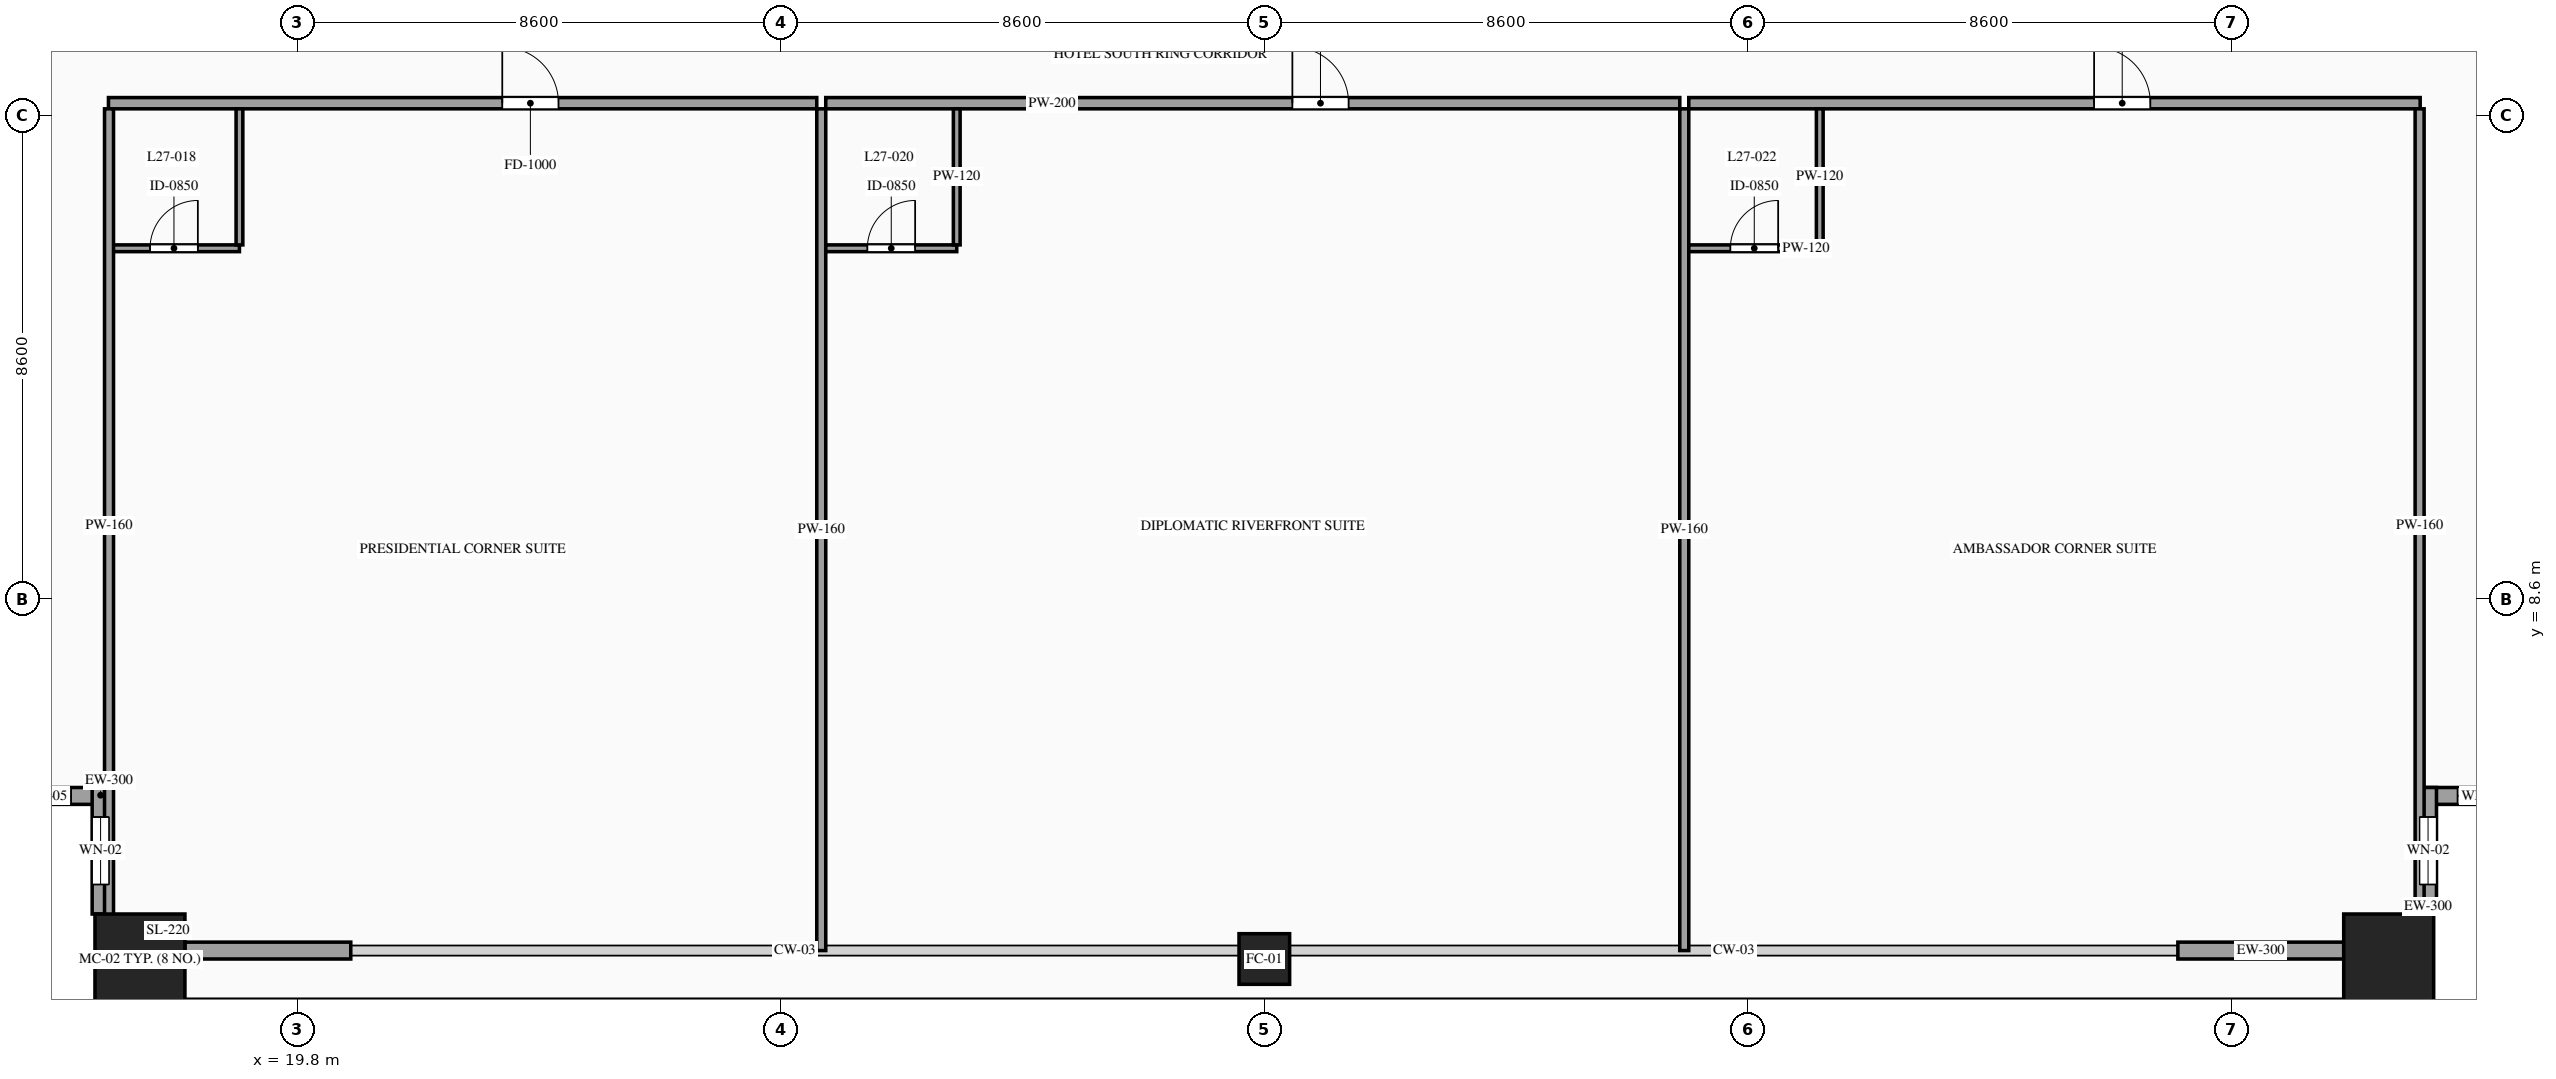
"""IFC4 building model, lengths in metres.
Left out: names, types, materials, properties, quantities, classifications, styles, units other than length and angle.
Written with IfcOpenShell. Run it as: python <this file> out.ifc"""

import sys

from ifc_helpers import new_model, si_unit, direction, frame, frame_2d, origin, origin_2d, place, context, subcontext, project, spatial, rectangle, hollow_rectangle, extrude, source, transform, mapped, element, fill, save


model = new_model("IFC4")
c1 = context("Model", 3, precision=1e-05, world=origin(), true_north=direction((0.0, 1.0)))
c2 = subcontext(c1, "Body", "Model", "MODEL_VIEW")
j1 = project(units=[si_unit("LENGTHUNIT", "METRE"), si_unit("PLANEANGLEUNIT", "RADIAN")], contexts=[c1])
p1 = place(None, origin())
s1 = spatial("IfcSite", under=j1, at=p1, CompositionType="ELEMENT")
p2 = place(p1, origin())
s2 = spatial("IfcBuilding", under=s1, at=p2, CompositionType="ELEMENT")
p3 = place(p2, frame((0.0, 0.0, 104.6)))
s3 = spatial("IfcBuildingStorey", under=s2, at=p3, CompositionType="ELEMENT", Elevation=104.6)
m1 = source(origin(), c2, "Body", "SweptSolid", [
    extrude(hollow_rectangle(XDim=1.6, YDim=1.6, WallThickness=0.07, at=origin_2d()), origin(), (0.0, 0.0, 1.0), 3.6),
])
p4 = place(p3, frame((17.0, 2.2, 0.0), z_axis=(0.0, 0.0, 1.0), x_axis=(1.0, 0.0, 0.0)))
e1 = element("IfcColumn", 1, at=p4, inside=s3, PredefinedType="COLUMN", context=c2, shape_type="MappedRepresentation", body=[
    mapped(m1, transform((0.0, 0.0, 0.0), scale=1.0)),
])
m2 = source(origin(), c2, "Body", "SweptSolid", [
    extrude(hollow_rectangle(XDim=0.9, YDim=0.9, WallThickness=0.042, at=origin_2d()), origin(), (0.0, 0.0, 1.0), 3.6),
])
p5 = place(p3, frame((37.0, 2.2, 0.0), z_axis=(0.0, 0.0, 1.0), x_axis=(1.0, 0.0, 0.0)))
e2 = element("IfcColumn", 2, at=p5, inside=s3, PredefinedType="COLUMN", context=c2, shape_type="MappedRepresentation", body=[
    mapped(m2, transform((0.0, 0.0, 0.0), scale=1.0)),
])
p6 = place(p3, frame((57.0, 2.2, 0.0), z_axis=(0.0, 0.0, 1.0), x_axis=(1.0, 0.0, 0.0)))
e3 = element("IfcColumn", 3, at=p6, inside=s3, PredefinedType="COLUMN", context=c2, shape_type="MappedRepresentation", body=[
    mapped(m1, transform((0.0, 0.0, 0.0), scale=1.0)),
])
p7 = place(p3, frame((14.2, 5.1, 0.0), z_axis=(0.0, 0.0, 1.0), x_axis=(1.0, 0.0, 0.0)))
e4 = element("IfcWall", 4, at=p7, inside=s3, PredefinedType="SOLIDWALL", context=c2, shape_type="SweptSolid", body=[
    extrude(rectangle(XDim=2.25, YDim=0.3, at=frame_2d((1.125, 0.0))), origin(), (0.0, 0.0, 1.0), 3.38),
])
p8 = place(p7, frame((0.675, 0.0, 0.85)))
e5 = element("IfcOpeningElement", 5, at=p8, cuts=e4, PredefinedType="OPENING", context=c2, shape_type="SweptSolid", body=[
    extrude(rectangle(XDim=0.9, YDim=1.5, at=frame_2d((0.45, 0.75))), frame((0.0, 0.165, 0.0), z_axis=(0.0, -1.0, 0.0), x_axis=(1.0, 0.0, 0.0)), (0.0, 0.0, 1.0), 0.33),
])
p9 = place(p3, frame((16.3, 5.25, 0.0), z_axis=(0.0, 0.0, 1.0), x_axis=(0.0, -1.0, 0.0)))
e6 = element("IfcWall", 6, at=p9, inside=s3, PredefinedType="SOLIDWALL", context=c2, shape_type="SweptSolid", body=[
    extrude(rectangle(XDim=2.25, YDim=0.3, at=frame_2d((1.125, 0.0))), origin(), (0.0, 0.0, 1.0), 3.38),
])
p10 = place(p9, frame((0.525, 0.0, 0.85)))
e7 = element("IfcOpeningElement", 7, at=p10, cuts=e6, PredefinedType="OPENING", context=c2, shape_type="SweptSolid", body=[
    extrude(rectangle(XDim=1.2, YDim=2.1, at=frame_2d((0.6, 1.05))), frame((0.0, 0.165, 0.0), z_axis=(0.0, -1.0, 0.0), x_axis=(1.0, 0.0, 0.0)), (0.0, 0.0, 1.0), 0.33),
])
p11 = place(p3, frame((57.55, 5.1, 0.0), z_axis=(0.0, 0.0, 1.0), x_axis=(1.0, 0.0, 0.0)))
e8 = element("IfcWall", 8, at=p11, inside=s3, PredefinedType="SOLIDWALL", context=c2, shape_type="SweptSolid", body=[
    extrude(rectangle(XDim=2.25, YDim=0.3, at=frame_2d((1.125, 0.0))), origin(), (0.0, 0.0, 1.0), 3.38),
])
p12 = place(p11, frame((0.675, 0.0, 0.85)))
e9 = element("IfcOpeningElement", 9, at=p12, cuts=e8, PredefinedType="OPENING", context=c2, shape_type="SweptSolid", body=[
    extrude(rectangle(XDim=0.9, YDim=1.5, at=frame_2d((0.45, 0.75))), frame((0.0, 0.165, 0.0), z_axis=(0.0, -1.0, 0.0), x_axis=(1.0, 0.0, 0.0)), (0.0, 0.0, 1.0), 0.33),
])
p13 = place(p3, frame((57.7, 3.0, 0.0), z_axis=(0.0, 0.0, 1.0), x_axis=(0.0, 1.0, 0.0)))
e10 = element("IfcWall", 10, at=p13, inside=s3, PredefinedType="SOLIDWALL", context=c2, shape_type="SweptSolid", body=[
    extrude(rectangle(XDim=2.25, YDim=0.3, at=frame_2d((1.125, 0.0))), origin(), (0.0, 0.0, 1.0), 3.38),
])
p14 = place(p13, frame((0.525, 0.0, 0.85)))
e11 = element("IfcOpeningElement", 11, at=p14, cuts=e10, PredefinedType="OPENING", context=c2, shape_type="SweptSolid", body=[
    extrude(rectangle(XDim=1.2, YDim=2.1, at=frame_2d((0.6, 1.05))), frame((0.0, 0.165, 0.0), z_axis=(0.0, -1.0, 0.0), x_axis=(1.0, 0.0, 0.0)), (0.0, 0.0, 1.0), 0.33),
])
m3 = source(origin(), c2, "Body", "SweptSolid", [
    extrude(rectangle(XDim=2.95, YDim=0.3, at=frame_2d((1.475, 0.0))), origin(), (0.0, 0.0, 1.0), 2.775),
])
for number, where, z_axis, x_axis in (
    (12, (17.8, 2.35, 0.0), (0.0, 0.0, 1.0), (1.0, 0.0, 0.0)),
    (13, (53.25, 2.35, 0.0), (0.0, 0.0, 1.0), (1.0, 0.0, 0.0)),
):
    element("IfcWall", number, at=place(p3, frame(where, z_axis=z_axis, x_axis=x_axis)), inside=s3, PredefinedType="SOLIDWALL", context=c2, shape_type="MappedRepresentation", body=[
        mapped(m3, transform((0.0, 0.0, 0.0), scale=1.0)),
    ])
p15 = place(p3, frame((16.44, 17.42, 0.0), z_axis=(0.0, 0.0, 1.0), x_axis=(1.0, 0.0, 0.0)))
e14 = element("IfcWall", 14, at=p15, inside=s3, PredefinedType="PARTITIONING", context=c2, shape_type="SweptSolid", body=[
    extrude(rectangle(XDim=12.599, YDim=0.2, at=frame_2d((6.3, 0.0))), origin(), (0.0, 0.0, 1.0), 3.38),
])
p16 = place(p15, frame((7.005, 0.0, 0.0)))
e15 = element("IfcOpeningElement", 15, at=p16, cuts=e14, PredefinedType="OPENING", context=c2, shape_type="SweptSolid", body=[
    extrude(rectangle(XDim=1.0, YDim=2.2, at=frame_2d((0.5, 1.1))), frame((0.0, 0.115, 0.0), z_axis=(0.0, -1.0, 0.0), x_axis=(1.0, 0.0, 0.0)), (0.0, 0.0, 1.0), 0.23),
])
m4 = source(origin(), c2, "Body", "SweptSolid", [
    extrude(rectangle(XDim=14.97, YDim=0.16, at=frame_2d((7.485, 0.0))), origin(), (0.0, 0.0, 1.0), 3.38),
])
p17 = place(p3, frame((29.119, 2.35, 0.0), z_axis=(0.0, 0.0, 1.0), x_axis=(0.0, 1.0, 0.0)))
e16 = element("IfcWall", 16, at=p17, inside=s3, PredefinedType="PARTITIONING", context=c2, shape_type="MappedRepresentation", body=[
    mapped(m4, transform((0.0, 0.0, 0.0), scale=1.0)),
])
p18 = place(p3, frame((16.44, 14.84, 0.0), z_axis=(0.0, 0.0, 1.0), x_axis=(1.0, 0.0, 0.0)))
e17 = element("IfcWall", 17, at=p18, inside=s3, PredefinedType="PARTITIONING", context=c2, shape_type="SweptSolid", body=[
    extrude(rectangle(XDim=2.33, YDim=0.12, at=frame_2d((1.165, 0.0))), origin(), (0.0, 0.0, 1.0), 3.38),
])
p19 = place(p18, frame((0.74, 0.0, 0.0)))
e18 = element("IfcOpeningElement", 18, at=p19, cuts=e17, PredefinedType="OPENING", context=c2, shape_type="SweptSolid", body=[
    extrude(rectangle(XDim=0.85, YDim=2.1, at=frame_2d((0.425, 1.05))), frame((0.0, 0.075, 0.0), z_axis=(0.0, -1.0, 0.0), x_axis=(1.0, 0.0, 0.0)), (0.0, 0.0, 1.0), 0.15),
])
m5 = source(origin(), c2, "Body", "SweptSolid", [
    extrude(rectangle(XDim=2.42, YDim=0.12, at=frame_2d((1.21, 0.0))), origin(), (0.0, 0.0, 1.0), 3.38),
])
p20 = place(p3, frame((18.77, 14.9, 0.0), z_axis=(0.0, 0.0, 1.0), x_axis=(0.0, 1.0, 0.0)))
e19 = element("IfcWall", 19, at=p20, inside=s3, PredefinedType="PARTITIONING", context=c2, shape_type="MappedRepresentation", body=[
    mapped(m5, transform((0.0, 0.0, 0.0), scale=1.0)),
])
p21 = place(p3, frame((29.199, 17.42, 0.0), z_axis=(0.0, 0.0, 1.0), x_axis=(1.0, 0.0, 0.0)))
e20 = element("IfcWall", 20, at=p21, inside=s3, PredefinedType="PARTITIONING", context=c2, shape_type="SweptSolid", body=[
    extrude(rectangle(XDim=15.191, YDim=0.2, at=frame_2d((7.595, 0.0))), origin(), (0.0, 0.0, 1.0), 3.38),
])
p22 = place(p21, frame((8.3, 0.0, 0.0)))
e21 = element("IfcOpeningElement", 21, at=p22, cuts=e20, PredefinedType="OPENING", context=c2, shape_type="SweptSolid", body=[
    extrude(rectangle(XDim=1.0, YDim=2.2, at=frame_2d((0.5, 1.1))), frame((0.0, 0.115, 0.0), z_axis=(0.0, -1.0, 0.0), x_axis=(1.0, 0.0, 0.0)), (0.0, 0.0, 1.0), 0.23),
])
p23 = place(p3, frame((44.47, 2.35, 0.0), z_axis=(0.0, 0.0, 1.0), x_axis=(0.0, 1.0, 0.0)))
e22 = element("IfcWall", 22, at=p23, inside=s3, PredefinedType="PARTITIONING", context=c2, shape_type="MappedRepresentation", body=[
    mapped(m4, transform((0.0, 0.0, 0.0), scale=1.0)),
])
p24 = place(p3, frame((29.199, 14.84, 0.0), z_axis=(0.0, 0.0, 1.0), x_axis=(1.0, 0.0, 0.0)))
e23 = element("IfcWall", 23, at=p24, inside=s3, PredefinedType="PARTITIONING", context=c2, shape_type="SweptSolid", body=[
    extrude(rectangle(XDim=2.33, YDim=0.12, at=frame_2d((1.165, 0.0))), origin(), (0.0, 0.0, 1.0), 3.38),
])
p25 = place(p24, frame((0.74, 0.0, 0.0)))
e24 = element("IfcOpeningElement", 24, at=p25, cuts=e23, PredefinedType="OPENING", context=c2, shape_type="SweptSolid", body=[
    extrude(rectangle(XDim=0.85, YDim=2.1, at=frame_2d((0.425, 1.05))), frame((0.0, 0.075, 0.0), z_axis=(0.0, -1.0, 0.0), x_axis=(1.0, 0.0, 0.0)), (0.0, 0.0, 1.0), 0.15),
])
p26 = place(p3, frame((31.529, 14.9, 0.0), z_axis=(0.0, 0.0, 1.0), x_axis=(0.0, 1.0, 0.0)))
e25 = element("IfcWall", 25, at=p26, inside=s3, PredefinedType="PARTITIONING", context=c2, shape_type="MappedRepresentation", body=[
    mapped(m5, transform((0.0, 0.0, 0.0), scale=1.0)),
])
p27 = place(p3, frame((44.55, 17.42, 0.0), z_axis=(0.0, 0.0, 1.0), x_axis=(1.0, 0.0, 0.0)))
e26 = element("IfcWall", 26, at=p27, inside=s3, PredefinedType="PARTITIONING", context=c2, shape_type="SweptSolid", body=[
    extrude(rectangle(XDim=13.01, YDim=0.2, at=frame_2d((6.505, 0.0))), origin(), (0.0, 0.0, 1.0), 3.38),
])
p28 = place(p27, frame((7.21, 0.0, 0.0)))
e27 = element("IfcOpeningElement", 27, at=p28, cuts=e26, PredefinedType="OPENING", context=c2, shape_type="SweptSolid", body=[
    extrude(rectangle(XDim=1.0, YDim=2.2, at=frame_2d((0.5, 1.1))), frame((0.0, 0.115, 0.0), z_axis=(0.0, -1.0, 0.0), x_axis=(1.0, 0.0, 0.0)), (0.0, 0.0, 1.0), 0.23),
])
m6 = source(origin(), c2, "Body", "SweptSolid", [
    extrude(rectangle(XDim=14.82, YDim=0.16, at=frame_2d((7.41, 0.0))), origin(), (0.0, 0.0, 1.0), 3.38),
])
for number, where, z_axis, x_axis in (
    (28, (16.45, 2.5, 0.0), (0.0, 0.0, 1.0), (0.0, 1.0, 0.0)),
    (29, (57.55, 2.5, 0.0), (0.0, 0.0, 1.0), (0.0, 1.0, 0.0)),
):
    element("IfcWall", number, at=place(p3, frame(where, z_axis=z_axis, x_axis=x_axis)), inside=s3, PredefinedType="PARTITIONING", context=c2, shape_type="MappedRepresentation", body=[
        mapped(m6, transform((0.0, 0.0, 0.0), scale=1.0)),
    ])
p29 = place(p3, frame((44.55, 14.84, 0.0), z_axis=(0.0, 0.0, 1.0), x_axis=(1.0, 0.0, 0.0)))
e30 = element("IfcWall", 30, at=p29, inside=s3, PredefinedType="PARTITIONING", context=c2, shape_type="SweptSolid", body=[
    extrude(rectangle(XDim=2.33, YDim=0.12, at=frame_2d((1.165, 0.0))), origin(), (0.0, 0.0, 1.0), 3.38),
])
p30 = place(p29, frame((0.74, 0.0, 0.0)))
e31 = element("IfcOpeningElement", 31, at=p30, cuts=e30, PredefinedType="OPENING", context=c2, shape_type="SweptSolid", body=[
    extrude(rectangle(XDim=0.85, YDim=2.1, at=frame_2d((0.425, 1.05))), frame((0.0, 0.075, 0.0), z_axis=(0.0, -1.0, 0.0), x_axis=(1.0, 0.0, 0.0)), (0.0, 0.0, 1.0), 0.15),
])
p31 = place(p3, frame((46.88, 14.9, 0.0), z_axis=(0.0, 0.0, 1.0), x_axis=(0.0, 1.0, 0.0)))
e32 = element("IfcWall", 32, at=p31, inside=s3, PredefinedType="PARTITIONING", context=c2, shape_type="MappedRepresentation", body=[
    mapped(m5, transform((0.0, 0.0, 0.0), scale=1.0)),
])
m7 = source(origin(), c2, "Body", "SweptSolid", [
    extrude(rectangle(XDim=0.9, YDim=1.5, at=frame_2d((0.45, 0.75))), frame((0.0, 0.03, 0.0), z_axis=(0.0, -1.0, 0.0), x_axis=(1.0, 0.0, 0.0)), (0.0, 0.0, 1.0), 0.06),
])
p32 = place(p8, origin())
e33 = element("IfcWindow", 33, at=p32, inside=s3, PartitioningType="SINGLE_PANEL", PredefinedType="WINDOW", context=c2, shape_type="MappedRepresentation", body=[
    mapped(m7, transform((0.0, 0.0, 0.0), scale=1.0)),
])
fill(e5, e33)
m8 = source(origin(), c2, "Body", "SweptSolid", [
    extrude(rectangle(XDim=1.2, YDim=2.1, at=frame_2d((0.6, 1.05))), frame((0.0, 0.03, 0.0), z_axis=(0.0, -1.0, 0.0), x_axis=(1.0, 0.0, 0.0)), (0.0, 0.0, 1.0), 0.06),
])
p33 = place(p10, origin())
e34 = element("IfcWindow", 34, at=p33, inside=s3, PartitioningType="SINGLE_PANEL", PredefinedType="WINDOW", context=c2, shape_type="MappedRepresentation", body=[
    mapped(m8, transform((0.0, 0.0, 0.0), scale=1.0)),
])
fill(e7, e34)
p34 = place(p12, origin())
e35 = element("IfcWindow", 35, at=p34, inside=s3, PartitioningType="SINGLE_PANEL", PredefinedType="WINDOW", context=c2, shape_type="MappedRepresentation", body=[
    mapped(m7, transform((0.0, 0.0, 0.0), scale=1.0)),
])
fill(e9, e35)
p35 = place(p14, origin())
e36 = element("IfcWindow", 36, at=p35, inside=s3, PartitioningType="SINGLE_PANEL", PredefinedType="WINDOW", context=c2, shape_type="MappedRepresentation", body=[
    mapped(m8, transform((0.0, 0.0, 0.0), scale=1.0)),
])
fill(e11, e36)
m9 = source(origin(), c2, "Body", "SweptSolid", [
    extrude(rectangle(XDim=1.0, YDim=2.2, at=frame_2d((0.5, 1.1))), frame((0.0, 0.025, 0.0), z_axis=(0.0, -1.0, 0.0), x_axis=(1.0, 0.0, 0.0)), (0.0, 0.0, 1.0), 0.05),
])
p36 = place(p16, origin())
e37 = element("IfcDoor", 37, at=p36, inside=s3, OperationType="SINGLE_SWING_LEFT", PredefinedType="DOOR", context=c2, shape_type="MappedRepresentation", body=[
    mapped(m9, transform((0.0, 0.0, 0.0), scale=1.0)),
])
fill(e15, e37)
m10 = source(origin(), c2, "Body", "SweptSolid", [
    extrude(rectangle(XDim=0.85, YDim=2.1, at=frame_2d((0.425, 1.05))), frame((0.0, 0.025, 0.0), z_axis=(0.0, -1.0, 0.0), x_axis=(1.0, 0.0, 0.0)), (0.0, 0.0, 1.0), 0.05),
])
p37 = place(p19, origin())
e38 = element("IfcDoor", 38, at=p37, inside=s3, OperationType="SINGLE_SWING_RIGHT", PredefinedType="DOOR", context=c2, shape_type="MappedRepresentation", body=[
    mapped(m10, transform((0.0, 0.0, 0.0), scale=1.0)),
])
fill(e18, e38)
p38 = place(p22, origin())
e39 = element("IfcDoor", 39, at=p38, inside=s3, OperationType="SINGLE_SWING_LEFT", PredefinedType="DOOR", context=c2, shape_type="MappedRepresentation", body=[
    mapped(m9, transform((0.0, 0.0, 0.0), scale=1.0)),
])
fill(e21, e39)
p39 = place(p25, origin())
e40 = element("IfcDoor", 40, at=p39, inside=s3, OperationType="SINGLE_SWING_RIGHT", PredefinedType="DOOR", context=c2, shape_type="MappedRepresentation", body=[
    mapped(m10, transform((0.0, 0.0, 0.0), scale=1.0)),
])
fill(e24, e40)
p40 = place(p28, origin())
e41 = element("IfcDoor", 41, at=p40, inside=s3, OperationType="SINGLE_SWING_LEFT", PredefinedType="DOOR", context=c2, shape_type="MappedRepresentation", body=[
    mapped(m9, transform((0.0, 0.0, 0.0), scale=1.0)),
])
fill(e27, e41)
p41 = place(p30, origin())
e42 = element("IfcDoor", 42, at=p41, inside=s3, OperationType="SINGLE_SWING_RIGHT", PredefinedType="DOOR", context=c2, shape_type="MappedRepresentation", body=[
    mapped(m10, transform((0.0, 0.0, 0.0), scale=1.0)),
])
fill(e31, e42)
save(model, sys.argv[1])
